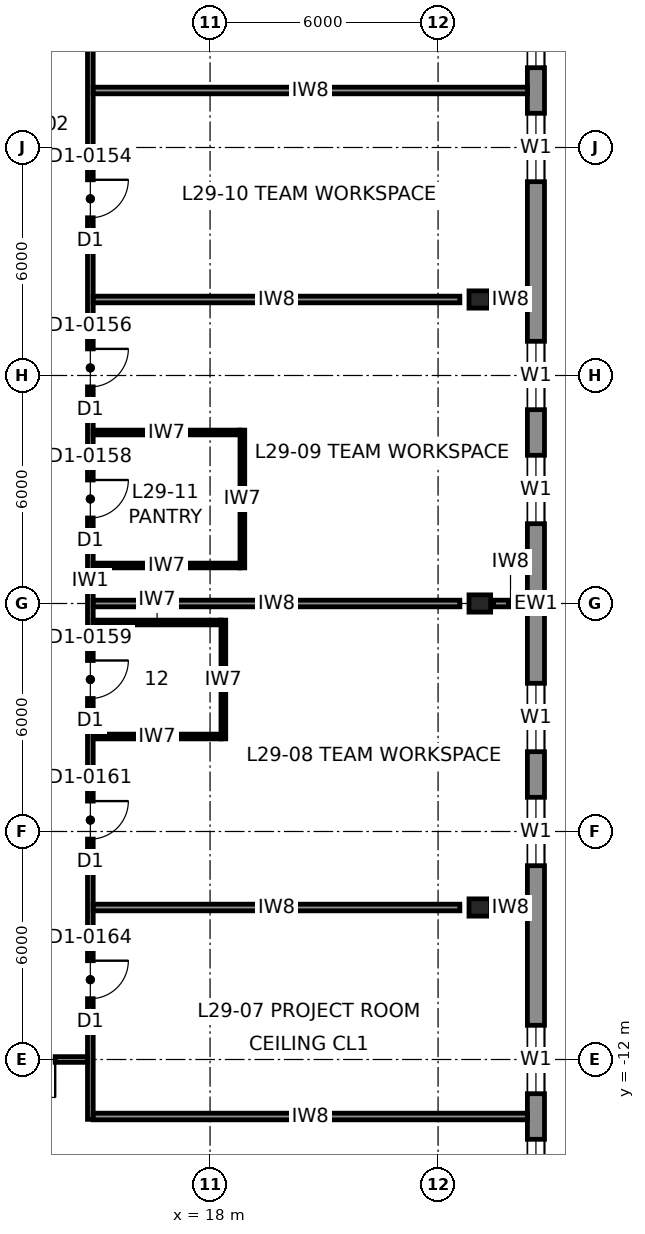
"""IFC4 building model, lengths in metres.
Left out: names, types, materials, properties, quantities, classifications, styles, units other than length and angle.
Written with IfcOpenShell. Run it as: python <this file> out.ifc"""

import sys

from ifc_helpers import new_model, si_unit, direction, frame, frame_2d, origin, origin_2d, place, context, subcontext, project, spatial, rectangle, i_section, extrude, element, fill, save


model = new_model("IFC4")
c1 = context("Model", 3, precision=1e-05, world=origin(), true_north=direction((0.0, 1.0)))
c2 = subcontext(c1, "Body", "Model", "MODEL_VIEW")
j1 = project(units=[si_unit("LENGTHUNIT", "METRE"), si_unit("PLANEANGLEUNIT", "RADIAN")], contexts=[c1])
p1 = place(None, origin())
s1 = spatial("IfcSite", under=j1, at=p1, CompositionType="ELEMENT")
p2 = place(p1, origin())
s2 = spatial("IfcBuilding", under=s1, at=p2, CompositionType="ELEMENT")
p3 = place(p2, frame((0.0, 0.0, 143.8)))
s3 = spatial("IfcBuildingStorey", under=s2, at=p3, CompositionType="ELEMENT", Elevation=143.8)
for number, where, z_axis, x_axis in (
    (1, (25.098, 0.0, 0.0), (-0.04, 0.0, 0.999), (0.0, -1.0, 0.0)),
    (2, (25.098, -8.0, 0.0), (-0.04, 0.0, 0.999), (0.0, -1.0, 0.0)),
    (3, (25.098, 8.0, 0.0), (-0.04, 0.0, 0.999), (0.0, -1.0, 0.0)),
):
    element("IfcColumn", number, at=place(p3, frame(where, z_axis=z_axis, x_axis=x_axis)), inside=s3, PredefinedType="COLUMN", context=c2, shape_type="SweptSolid", body=[
        extrude(i_section(OverallWidth=0.454, OverallDepth=0.569, WebThickness=0.078, FlangeThickness=0.125, at=origin_2d()), origin(), (0.0, 0.0, 1.0), 4.003),
    ])
p4 = place(p3, frame((26.575, -22.3, 0.0), z_axis=(0.0, 0.0, 1.0), x_axis=(0.0, 1.0, 0.0)))
e4 = element("IfcWall", 4, at=p4, inside=s3, PredefinedType="SOLIDWALL", context=c2, shape_type="SweptSolid", body=[
    extrude(rectangle(XDim=44.6, YDim=0.45, at=frame_2d((22.3, 0.0))), origin(), (0.0, 0.0, 1.0), 3.83),
])
p5 = place(p4, frame((3.4, 0.0, 0.7)))
e5 = element("IfcOpeningElement", 5, at=p5, cuts=e4, PredefinedType="OPENING", context=c2, shape_type="SweptSolid", body=[
    extrude(rectangle(XDim=1.8, YDim=2.6, at=frame_2d((0.9, 1.3))), frame((0.0, 0.235, 0.0), z_axis=(0.0, -1.0, 0.0), x_axis=(1.0, 0.0, 0.0)), (0.0, 0.0, 1.0), 0.47),
])
p6 = place(p4, frame((6.4, 0.0, 0.7)))
e6 = element("IfcOpeningElement", 6, at=p6, cuts=e4, PredefinedType="OPENING", context=c2, shape_type="SweptSolid", body=[
    extrude(rectangle(XDim=1.8, YDim=2.6, at=frame_2d((0.9, 1.3))), frame((0.0, 0.235, 0.0), z_axis=(0.0, -1.0, 0.0), x_axis=(1.0, 0.0, 0.0)), (0.0, 0.0, 1.0), 0.47),
])
p7 = place(p4, frame((9.4, 0.0, 0.7)))
e7 = element("IfcOpeningElement", 7, at=p7, cuts=e4, PredefinedType="OPENING", context=c2, shape_type="SweptSolid", body=[
    extrude(rectangle(XDim=1.8, YDim=2.6, at=frame_2d((0.9, 1.3))), frame((0.0, 0.235, 0.0), z_axis=(0.0, -1.0, 0.0), x_axis=(1.0, 0.0, 0.0)), (0.0, 0.0, 1.0), 0.47),
])
p8 = place(p4, frame((15.4, 0.0, 0.7)))
e8 = element("IfcOpeningElement", 8, at=p8, cuts=e4, PredefinedType="OPENING", context=c2, shape_type="SweptSolid", body=[
    extrude(rectangle(XDim=1.8, YDim=2.6, at=frame_2d((0.9, 1.3))), frame((0.0, 0.235, 0.0), z_axis=(0.0, -1.0, 0.0), x_axis=(1.0, 0.0, 0.0)), (0.0, 0.0, 1.0), 0.47),
])
p9 = place(p4, frame((18.4, 0.0, 0.7)))
e9 = element("IfcOpeningElement", 9, at=p9, cuts=e4, PredefinedType="OPENING", context=c2, shape_type="SweptSolid", body=[
    extrude(rectangle(XDim=1.8, YDim=2.6, at=frame_2d((0.9, 1.3))), frame((0.0, 0.235, 0.0), z_axis=(0.0, -1.0, 0.0), x_axis=(1.0, 0.0, 0.0)), (0.0, 0.0, 1.0), 0.47),
])
p10 = place(p4, frame((24.4, 0.0, 0.7)))
e10 = element("IfcOpeningElement", 10, at=p10, cuts=e4, PredefinedType="OPENING", context=c2, shape_type="SweptSolid", body=[
    extrude(rectangle(XDim=1.8, YDim=2.6, at=frame_2d((0.9, 1.3))), frame((0.0, 0.235, 0.0), z_axis=(0.0, -1.0, 0.0), x_axis=(1.0, 0.0, 0.0)), (0.0, 0.0, 1.0), 0.47),
])
p11 = place(p4, frame((27.4, 0.0, 0.7)))
e11 = element("IfcOpeningElement", 11, at=p11, cuts=e4, PredefinedType="OPENING", context=c2, shape_type="SweptSolid", body=[
    extrude(rectangle(XDim=1.8, YDim=2.6, at=frame_2d((0.9, 1.3))), frame((0.0, 0.235, 0.0), z_axis=(0.0, -1.0, 0.0), x_axis=(1.0, 0.0, 0.0)), (0.0, 0.0, 1.0), 0.47),
])
p12 = place(p4, frame((33.4, 0.0, 0.7)))
e12 = element("IfcOpeningElement", 12, at=p12, cuts=e4, PredefinedType="OPENING", context=c2, shape_type="SweptSolid", body=[
    extrude(rectangle(XDim=1.8, YDim=2.6, at=frame_2d((0.9, 1.3))), frame((0.0, 0.235, 0.0), z_axis=(0.0, -1.0, 0.0), x_axis=(1.0, 0.0, 0.0)), (0.0, 0.0, 1.0), 0.47),
])
p13 = place(p4, frame((36.4, 0.0, 0.7)))
e13 = element("IfcOpeningElement", 13, at=p13, cuts=e4, PredefinedType="OPENING", context=c2, shape_type="SweptSolid", body=[
    extrude(rectangle(XDim=1.8, YDim=2.6, at=frame_2d((0.9, 1.3))), frame((0.0, 0.235, 0.0), z_axis=(0.0, -1.0, 0.0), x_axis=(1.0, 0.0, 0.0)), (0.0, 0.0, 1.0), 0.47),
])
p14 = place(p4, frame((39.4, 0.0, 0.7)))
e14 = element("IfcOpeningElement", 14, at=p14, cuts=e4, PredefinedType="OPENING", context=c2, shape_type="SweptSolid", body=[
    extrude(rectangle(XDim=1.8, YDim=2.6, at=frame_2d((0.9, 1.3))), frame((0.0, 0.235, 0.0), z_axis=(0.0, -1.0, 0.0), x_axis=(1.0, 0.0, 0.0)), (0.0, 0.0, 1.0), 0.47),
])
p15 = place(p3, frame((14.85, -13.575, 0.0), z_axis=(0.0, 0.0, 1.0), x_axis=(0.0, 1.0, 0.0)))
e15 = element("IfcWall", 15, at=p15, inside=s3, PredefinedType="PARTITIONING", context=c2, shape_type="SweptSolid", body=[
    extrude(rectangle(XDim=28.35, YDim=0.15, at=frame_2d((14.175, 0.0))), origin(), (0.0, 0.0, 1.0), 3.83),
])
p16 = place(p15, frame((3.175, 0.0, 0.0)))
e16 = element("IfcOpeningElement", 16, at=p16, cuts=e15, PredefinedType="OPENING", context=c2, shape_type="SweptSolid", body=[
    extrude(rectangle(XDim=1.0, YDim=2.3, at=frame_2d((0.5, 1.15))), frame((0.0, 0.085, 0.0), z_axis=(0.0, -1.0, 0.0), x_axis=(1.0, 0.0, 0.0)), (0.0, 0.0, 1.0), 0.17),
])
p17 = place(p15, frame((7.375, 0.0, 0.0)))
e17 = element("IfcOpeningElement", 17, at=p17, cuts=e15, PredefinedType="OPENING", context=c2, shape_type="SweptSolid", body=[
    extrude(rectangle(XDim=1.0, YDim=2.3, at=frame_2d((0.5, 1.15))), frame((0.0, 0.085, 0.0), z_axis=(0.0, -1.0, 0.0), x_axis=(1.0, 0.0, 0.0)), (0.0, 0.0, 1.0), 0.17),
])
p18 = place(p15, frame((19.275, 0.0, 0.0)))
e18 = element("IfcOpeningElement", 18, at=p18, cuts=e15, PredefinedType="OPENING", context=c2, shape_type="SweptSolid", body=[
    extrude(rectangle(XDim=1.0, YDim=2.3, at=frame_2d((0.5, 1.15))), frame((0.0, 0.085, 0.0), z_axis=(0.0, -1.0, 0.0), x_axis=(1.0, 0.0, 0.0)), (0.0, 0.0, 1.0), 0.17),
])
p19 = place(p15, frame((23.725, 0.0, 0.0)))
e19 = element("IfcOpeningElement", 19, at=p19, cuts=e15, PredefinedType="OPENING", context=c2, shape_type="SweptSolid", body=[
    extrude(rectangle(XDim=1.0, YDim=2.3, at=frame_2d((0.5, 1.15))), frame((0.0, 0.085, 0.0), z_axis=(0.0, -1.0, 0.0), x_axis=(1.0, 0.0, 0.0)), (0.0, 0.0, 1.0), 0.17),
])
p20 = place(p15, frame((15.825, 0.0, 0.0)))
e20 = element("IfcOpeningElement", 20, at=p20, cuts=e15, PredefinedType="OPENING", context=c2, shape_type="SweptSolid", body=[
    extrude(rectangle(XDim=1.0, YDim=2.3, at=frame_2d((0.5, 1.15))), frame((0.0, 0.085, 0.0), z_axis=(0.0, -1.0, 0.0), x_axis=(1.0, 0.0, 0.0)), (0.0, 0.0, 1.0), 0.17),
])
p21 = place(p15, frame((11.075, 0.0, 0.0)))
e21 = element("IfcOpeningElement", 21, at=p21, cuts=e15, PredefinedType="OPENING", context=c2, shape_type="SweptSolid", body=[
    extrude(rectangle(XDim=1.0, YDim=2.3, at=frame_2d((0.5, 1.15))), frame((0.0, 0.085, 0.0), z_axis=(0.0, -1.0, 0.0), x_axis=(1.0, 0.0, 0.0)), (0.0, 0.0, 1.0), 0.17),
])
p22 = place(p3, frame((14.775, -12.0, 0.0), z_axis=(0.0, 0.0, 1.0), x_axis=(-1.0, 0.0, 0.0)))
e22 = element("IfcWall", 22, at=p22, inside=s3, PredefinedType="PARTITIONING", context=c2, shape_type="SweptSolid", body=[
    extrude(rectangle(XDim=2.775, YDim=0.15, at=frame_2d((1.387, 0.0))), origin(), (0.0, 0.0, 1.0), 3.83),
])
p23 = place(p22, frame((0.85, 0.0, 0.0)))
e23 = element("IfcOpeningElement", 23, at=p23, cuts=e22, PredefinedType="OPENING", context=c2, shape_type="SweptSolid", body=[
    extrude(rectangle(XDim=1.0, YDim=2.3, at=frame_2d((0.5, 1.15))), frame((0.0, 0.085, 0.0), z_axis=(0.0, -1.0, 0.0), x_axis=(1.0, 0.0, 0.0)), (0.0, 0.0, 1.0), 0.17),
])
for number, where, z_axis, x_axis in (
    (24, (14.925, 13.5, 0.0), (0.0, 0.0, 1.0), (1.0, 0.0, 0.0)),
    (25, (26.35, -13.5, 0.0), (0.0, 0.0, 1.0), (-1.0, 0.0, 0.0)),
):
    element("IfcWall", number, at=place(p3, frame(where, z_axis=z_axis, x_axis=x_axis)), inside=s3, PredefinedType="PARTITIONING", context=c2, shape_type="SweptSolid", body=[
        extrude(rectangle(XDim=11.425, YDim=0.175, at=frame_2d((5.712, 0.0))), origin(), (0.0, 0.0, 1.0), 3.83),
    ])
p24 = place(p3, frame((14.925, -8.0, 0.0), z_axis=(0.0, 0.0, 1.0), x_axis=(1.0, 0.0, 0.0)))
e26 = element("IfcWall", 26, at=p24, inside=s3, PredefinedType="PARTITIONING", context=c2, shape_type="SweptSolid", body=[
    extrude(rectangle(XDim=9.648, YDim=0.175, at=frame_2d((4.824, 0.0))), origin(), (0.0, 0.0, 1.0), 2.83),
])
p25 = place(p3, frame((25.462, -8.0, 0.0), z_axis=(0.0, 0.0, 1.0), x_axis=(1.0, 0.0, 0.0)))
e27 = element("IfcWall", 27, at=p25, inside=s3, PredefinedType="PARTITIONING", context=c2, shape_type="SweptSolid", body=[
    extrude(rectangle(XDim=0.888, YDim=0.175, at=frame_2d((0.444, 0.0))), origin(), (0.0, 0.0, 1.0), 3.83),
])
p26 = place(p3, frame((14.925, 0.0, 0.0), z_axis=(0.0, 0.0, 1.0), x_axis=(1.0, 0.0, 0.0)))
e28 = element("IfcWall", 28, at=p26, inside=s3, PredefinedType="PARTITIONING", context=c2, shape_type="SweptSolid", body=[
    extrude(rectangle(XDim=9.648, YDim=0.175, at=frame_2d((4.824, 0.0))), origin(), (0.0, 0.0, 1.0), 2.83),
])
p27 = place(p3, frame((25.462, 0.0, 0.0), z_axis=(0.0, 0.0, 1.0), x_axis=(1.0, 0.0, 0.0)))
e29 = element("IfcWall", 29, at=p27, inside=s3, PredefinedType="PARTITIONING", context=c2, shape_type="SweptSolid", body=[
    extrude(rectangle(XDim=0.888, YDim=0.175, at=frame_2d((0.444, 0.0))), origin(), (0.0, 0.0, 1.0), 3.83),
])
p28 = place(p3, frame((14.925, 8.0, 0.0), z_axis=(0.0, 0.0, 1.0), x_axis=(1.0, 0.0, 0.0)))
e30 = element("IfcWall", 30, at=p28, inside=s3, PredefinedType="PARTITIONING", context=c2, shape_type="SweptSolid", body=[
    extrude(rectangle(XDim=9.648, YDim=0.175, at=frame_2d((4.824, 0.0))), origin(), (0.0, 0.0, 1.0), 2.83),
])
p29 = place(p3, frame((25.462, 8.0, 0.0), z_axis=(0.0, 0.0, 1.0), x_axis=(1.0, 0.0, 0.0)))
e31 = element("IfcWall", 31, at=p29, inside=s3, PredefinedType="PARTITIONING", context=c2, shape_type="SweptSolid", body=[
    extrude(rectangle(XDim=0.888, YDim=0.175, at=frame_2d((0.444, 0.0))), origin(), (0.0, 0.0, 1.0), 3.83),
])
p30 = place(p3, frame((18.85, 0.938, 0.0), z_axis=(0.0, 0.0, 1.0), x_axis=(0.0, 1.0, 0.0)))
e32 = element("IfcWall", 32, at=p30, inside=s3, PredefinedType="PARTITIONING", context=c2, shape_type="SweptSolid", body=[
    extrude(rectangle(XDim=3.625, YDim=0.125, at=frame_2d((1.812, 0.0))), origin(), (0.0, 0.0, 1.0), 3.83),
])
for number, where, z_axis, x_axis in (
    (33, (14.925, 1.0, 0.0), (0.0, 0.0, 1.0), (1.0, 0.0, 0.0)),
    (34, (14.925, 4.5, 0.0), (0.0, 0.0, 1.0), (1.0, 0.0, 0.0)),
):
    element("IfcWall", number, at=place(p3, frame(where, z_axis=z_axis, x_axis=x_axis)), inside=s3, PredefinedType="PARTITIONING", context=c2, shape_type="SweptSolid", body=[
        extrude(rectangle(XDim=3.863, YDim=0.125, at=frame_2d((1.931, 0.0))), origin(), (0.0, 0.0, 1.0), 3.83),
    ])
p31 = place(p3, frame((18.35, -3.562, 0.0), z_axis=(0.0, 0.0, 1.0), x_axis=(0.0, 1.0, 0.0)))
e35 = element("IfcWall", 35, at=p31, inside=s3, PredefinedType="PARTITIONING", context=c2, shape_type="SweptSolid", body=[
    extrude(rectangle(XDim=3.125, YDim=0.125, at=frame_2d((1.562, 0.0))), origin(), (0.0, 0.0, 1.0), 3.83),
])
for number, where, z_axis, x_axis in (
    (36, (14.925, -3.5, 0.0), (0.0, 0.0, 1.0), (1.0, 0.0, 0.0)),
    (37, (14.925, -0.5, 0.0), (0.0, 0.0, 1.0), (1.0, 0.0, 0.0)),
):
    element("IfcWall", number, at=place(p3, frame(where, z_axis=z_axis, x_axis=x_axis)), inside=s3, PredefinedType="PARTITIONING", context=c2, shape_type="SweptSolid", body=[
        extrude(rectangle(XDim=3.363, YDim=0.125, at=frame_2d((1.681, 0.0))), origin(), (0.0, 0.0, 1.0), 3.83),
    ])
p32 = place(p6, origin())
e38 = element("IfcWindow", 38, at=p32, inside=s3, PartitioningType="SINGLE_PANEL", PredefinedType="WINDOW", context=c2, shape_type="SweptSolid", body=[
    extrude(rectangle(XDim=1.8, YDim=2.6, at=frame_2d((0.9, 1.3))), frame((0.0, 0.03, 0.0), z_axis=(0.0, -1.0, 0.0), x_axis=(1.0, 0.0, 0.0)), (0.0, 0.0, 1.0), 0.06),
])
fill(e6, e38)
p33 = place(p7, origin())
e39 = element("IfcWindow", 39, at=p33, inside=s3, PartitioningType="SINGLE_PANEL", PredefinedType="WINDOW", context=c2, shape_type="SweptSolid", body=[
    extrude(rectangle(XDim=1.8, YDim=2.6, at=frame_2d((0.9, 1.3))), frame((0.0, 0.03, 0.0), z_axis=(0.0, -1.0, 0.0), x_axis=(1.0, 0.0, 0.0)), (0.0, 0.0, 1.0), 0.06),
])
fill(e7, e39)
p34 = place(p8, origin())
e40 = element("IfcWindow", 40, at=p34, inside=s3, PartitioningType="SINGLE_PANEL", PredefinedType="WINDOW", context=c2, shape_type="SweptSolid", body=[
    extrude(rectangle(XDim=1.8, YDim=2.6, at=frame_2d((0.9, 1.3))), frame((0.0, 0.03, 0.0), z_axis=(0.0, -1.0, 0.0), x_axis=(1.0, 0.0, 0.0)), (0.0, 0.0, 1.0), 0.06),
])
fill(e8, e40)
p35 = place(p9, origin())
e41 = element("IfcWindow", 41, at=p35, inside=s3, PartitioningType="SINGLE_PANEL", PredefinedType="WINDOW", context=c2, shape_type="SweptSolid", body=[
    extrude(rectangle(XDim=1.8, YDim=2.6, at=frame_2d((0.9, 1.3))), frame((0.0, 0.03, 0.0), z_axis=(0.0, -1.0, 0.0), x_axis=(1.0, 0.0, 0.0)), (0.0, 0.0, 1.0), 0.06),
])
fill(e9, e41)
p36 = place(p10, origin())
e42 = element("IfcWindow", 42, at=p36, inside=s3, PartitioningType="SINGLE_PANEL", PredefinedType="WINDOW", context=c2, shape_type="SweptSolid", body=[
    extrude(rectangle(XDim=1.8, YDim=2.6, at=frame_2d((0.9, 1.3))), frame((0.0, 0.03, 0.0), z_axis=(0.0, -1.0, 0.0), x_axis=(1.0, 0.0, 0.0)), (0.0, 0.0, 1.0), 0.06),
])
fill(e10, e42)
p37 = place(p11, origin())
e43 = element("IfcWindow", 43, at=p37, inside=s3, PartitioningType="SINGLE_PANEL", PredefinedType="WINDOW", context=c2, shape_type="SweptSolid", body=[
    extrude(rectangle(XDim=1.8, YDim=2.6, at=frame_2d((0.9, 1.3))), frame((0.0, 0.03, 0.0), z_axis=(0.0, -1.0, 0.0), x_axis=(1.0, 0.0, 0.0)), (0.0, 0.0, 1.0), 0.06),
])
fill(e11, e43)
p38 = place(p12, origin())
e44 = element("IfcWindow", 44, at=p38, inside=s3, PartitioningType="SINGLE_PANEL", PredefinedType="WINDOW", context=c2, shape_type="SweptSolid", body=[
    extrude(rectangle(XDim=1.8, YDim=2.6, at=frame_2d((0.9, 1.3))), frame((0.0, 0.03, 0.0), z_axis=(0.0, -1.0, 0.0), x_axis=(1.0, 0.0, 0.0)), (0.0, 0.0, 1.0), 0.06),
])
fill(e12, e44)
p39 = place(p13, origin())
e45 = element("IfcWindow", 45, at=p39, inside=s3, PartitioningType="SINGLE_PANEL", PredefinedType="WINDOW", context=c2, shape_type="SweptSolid", body=[
    extrude(rectangle(XDim=1.8, YDim=2.6, at=frame_2d((0.9, 1.3))), frame((0.0, 0.03, 0.0), z_axis=(0.0, -1.0, 0.0), x_axis=(1.0, 0.0, 0.0)), (0.0, 0.0, 1.0), 0.06),
])
fill(e13, e45)
p40 = place(p23, origin())
e46 = element("IfcDoor", 46, at=p40, inside=s3, OperationType="SINGLE_SWING_LEFT", PredefinedType="DOOR", context=c2, shape_type="SweptSolid", body=[
    extrude(rectangle(XDim=1.0, YDim=2.3, at=frame_2d((0.5, 1.15))), frame((0.0, 0.025, 0.0), z_axis=(0.0, -1.0, 0.0), x_axis=(1.0, 0.0, 0.0)), (0.0, 0.0, 1.0), 0.05),
])
fill(e23, e46)
p41 = place(p16, frame((1.0, 0.0, 0.0), z_axis=(0.0, 0.0, 1.0), x_axis=(-1.0, 0.0, 0.0)))
e47 = element("IfcDoor", 47, at=p41, inside=s3, OperationType="SINGLE_SWING_LEFT", PredefinedType="DOOR", context=c2, shape_type="SweptSolid", body=[
    extrude(rectangle(XDim=1.0, YDim=2.3, at=frame_2d((0.5, 1.15))), frame((0.0, 0.025, 0.0), z_axis=(0.0, -1.0, 0.0), x_axis=(1.0, 0.0, 0.0)), (0.0, 0.0, 1.0), 0.05),
])
fill(e16, e47)
p42 = place(p17, frame((1.0, 0.0, 0.0), z_axis=(0.0, 0.0, 1.0), x_axis=(-1.0, 0.0, 0.0)))
e48 = element("IfcDoor", 48, at=p42, inside=s3, OperationType="SINGLE_SWING_LEFT", PredefinedType="DOOR", context=c2, shape_type="SweptSolid", body=[
    extrude(rectangle(XDim=1.0, YDim=2.3, at=frame_2d((0.5, 1.15))), frame((0.0, 0.025, 0.0), z_axis=(0.0, -1.0, 0.0), x_axis=(1.0, 0.0, 0.0)), (0.0, 0.0, 1.0), 0.05),
])
fill(e17, e48)
p43 = place(p18, frame((1.0, 0.0, 0.0), z_axis=(0.0, 0.0, 1.0), x_axis=(-1.0, 0.0, 0.0)))
e49 = element("IfcDoor", 49, at=p43, inside=s3, OperationType="SINGLE_SWING_LEFT", PredefinedType="DOOR", context=c2, shape_type="SweptSolid", body=[
    extrude(rectangle(XDim=1.0, YDim=2.3, at=frame_2d((0.5, 1.15))), frame((0.0, 0.025, 0.0), z_axis=(0.0, -1.0, 0.0), x_axis=(1.0, 0.0, 0.0)), (0.0, 0.0, 1.0), 0.05),
])
fill(e18, e49)
p44 = place(p19, frame((1.0, 0.0, 0.0), z_axis=(0.0, 0.0, 1.0), x_axis=(-1.0, 0.0, 0.0)))
e50 = element("IfcDoor", 50, at=p44, inside=s3, OperationType="SINGLE_SWING_LEFT", PredefinedType="DOOR", context=c2, shape_type="SweptSolid", body=[
    extrude(rectangle(XDim=1.0, YDim=2.3, at=frame_2d((0.5, 1.15))), frame((0.0, 0.025, 0.0), z_axis=(0.0, -1.0, 0.0), x_axis=(1.0, 0.0, 0.0)), (0.0, 0.0, 1.0), 0.05),
])
fill(e19, e50)
p45 = place(p20, frame((1.0, 0.0, 0.0), z_axis=(0.0, 0.0, 1.0), x_axis=(-1.0, 0.0, 0.0)))
e51 = element("IfcDoor", 51, at=p45, inside=s3, OperationType="SINGLE_SWING_LEFT", PredefinedType="DOOR", context=c2, shape_type="SweptSolid", body=[
    extrude(rectangle(XDim=1.0, YDim=2.3, at=frame_2d((0.5, 1.15))), frame((0.0, 0.025, 0.0), z_axis=(0.0, -1.0, 0.0), x_axis=(1.0, 0.0, 0.0)), (0.0, 0.0, 1.0), 0.05),
])
fill(e20, e51)
p46 = place(p21, frame((1.0, 0.0, 0.0), z_axis=(0.0, 0.0, 1.0), x_axis=(-1.0, 0.0, 0.0)))
e52 = element("IfcDoor", 52, at=p46, inside=s3, OperationType="SINGLE_SWING_LEFT", PredefinedType="DOOR", context=c2, shape_type="SweptSolid", body=[
    extrude(rectangle(XDim=1.0, YDim=2.3, at=frame_2d((0.5, 1.15))), frame((0.0, 0.025, 0.0), z_axis=(0.0, -1.0, 0.0), x_axis=(1.0, 0.0, 0.0)), (0.0, 0.0, 1.0), 0.05),
])
fill(e21, e52)
save(model, sys.argv[1])
